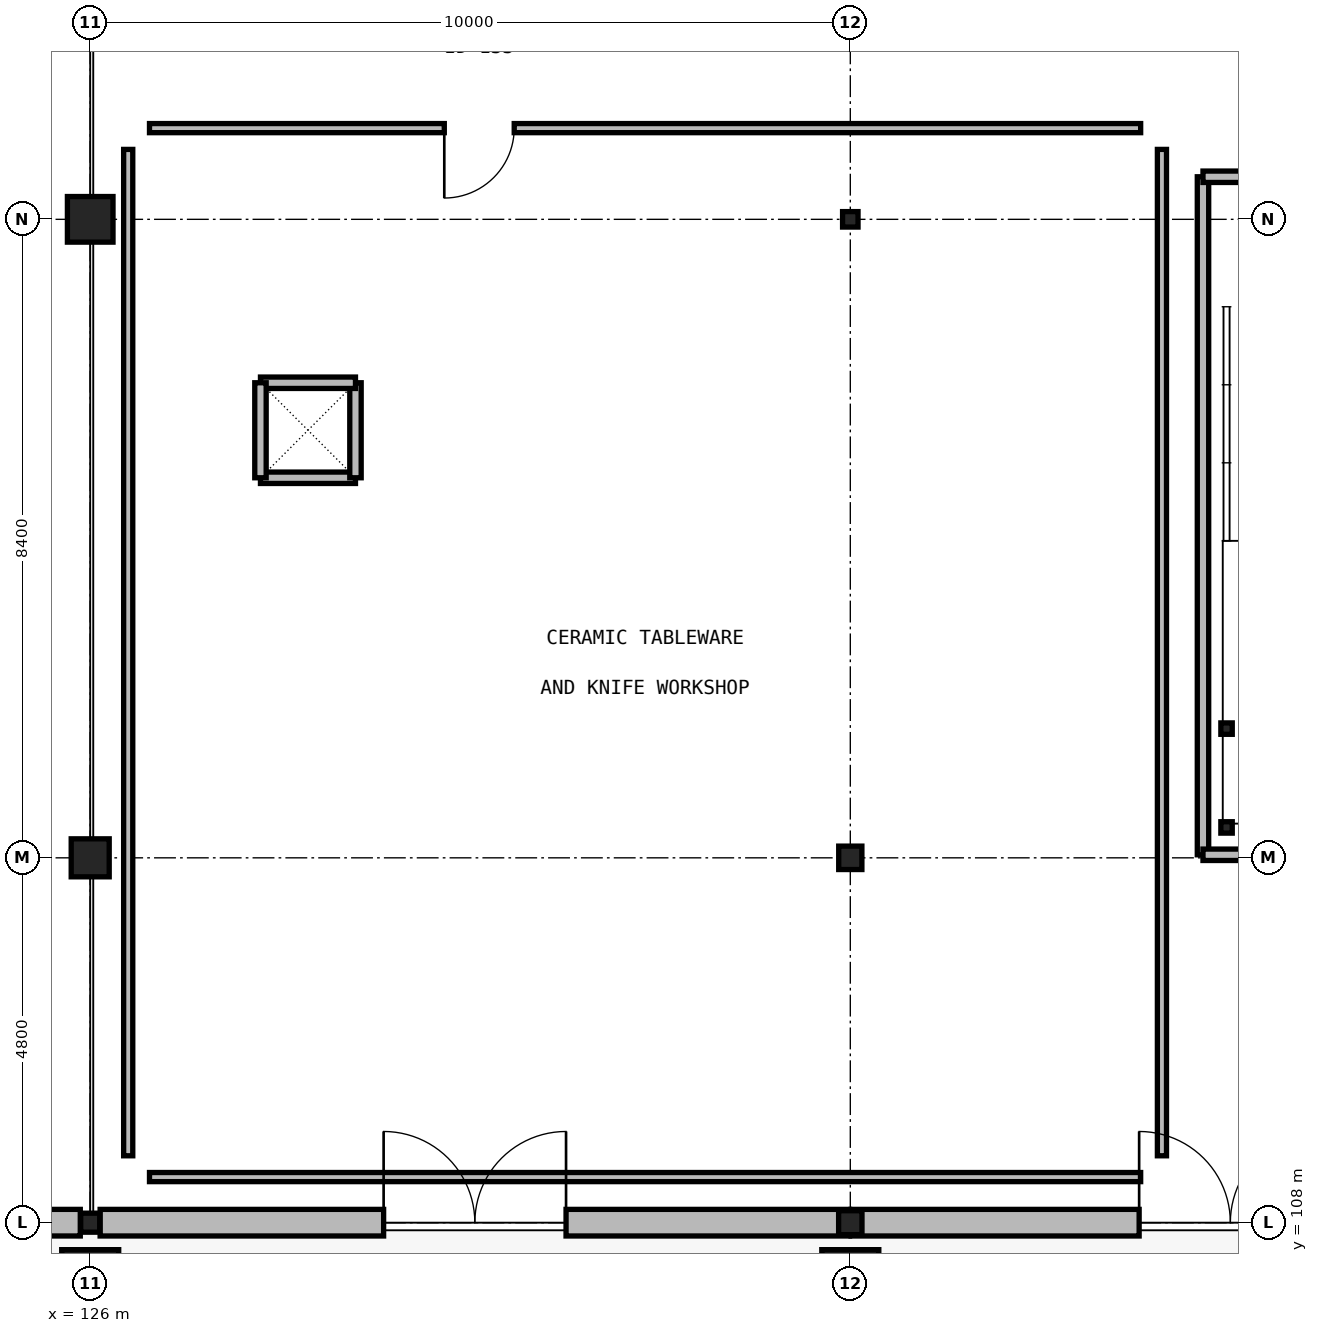
"""IFC4 building model, lengths in metres.
Left out: names, types, materials, properties, quantities, classifications, styles, units other than length and angle.
Written with IfcOpenShell. Run it as: python <this file> out.ifc"""

import sys

from ifc_helpers import new_model, si_unit, direction, frame, frame_2d, origin, origin_2d_with_axis, place, context, subcontext, project, spatial, rectangle, hollow_rectangle, i_section, extrude, element, fill, save


model = new_model("IFC4")
c1 = context("Model", 3, precision=1e-05, world=origin(), true_north=direction((0.0, 1.0)))
c2 = subcontext(c1, "Body", "Model", "MODEL_VIEW")
j1 = project(units=[si_unit("LENGTHUNIT", "METRE"), si_unit("PLANEANGLEUNIT", "RADIAN")], contexts=[c1])
p1 = place(None, origin())
s1 = spatial("IfcSite", under=j1, at=p1, CompositionType="ELEMENT")
p2 = place(p1, origin())
s2 = spatial("IfcBuilding", under=s1, at=p2, CompositionType="ELEMENT")
p3 = place(p2, origin())
s3 = spatial("IfcBuildingStorey", under=s2, at=p3, CompositionType="ELEMENT", Elevation=0.0)
for number, where, z_axis, x_axis in (
    (1, (126.0, 107.42, 0.0), (0.0, 0.0, 1.0), (1.0, 0.0, 0.0)),
    (2, (136.0, 107.42, 0.0), (0.0, 0.0, 1.0), (1.0, 0.0, 0.0)),
):
    element("IfcColumn", number, at=place(p3, frame(where, z_axis=z_axis, x_axis=x_axis)), inside=s3, PredefinedType="PILASTER", context=c2, shape_type="SweptSolid", body=[
        extrude(rectangle(XDim=0.75, YDim=0.45, at=origin_2d_with_axis()), origin(), (0.0, 0.0, 1.0), 4.5),
    ])
p4 = place(p3, frame((126.0, 108.0, -0.28), z_axis=(0.0, 0.0, 1.0), x_axis=(1.0, 0.0, 0.0)))
e3 = element("IfcColumn", 3, at=p4, inside=s3, PredefinedType="COLUMN", context=c2, shape_type="SweptSolid", body=[
    extrude(hollow_rectangle(XDim=0.25, YDim=0.25, WallThickness=0.009, InnerFilletRadius=0.009, OuterFilletRadius=0.018, at=origin_2d_with_axis()), origin(), (0.0, 0.0, 1.0), 4.78),
])
p5 = place(p3, frame((126.0, 112.8, -0.28), z_axis=(0.0, 0.0, 1.0), x_axis=(1.0, 0.0, 0.0)))
e4 = element("IfcColumn", 4, at=p5, inside=s3, PredefinedType="COLUMN", context=c2, shape_type="SweptSolid", body=[
    extrude(rectangle(XDim=0.5, YDim=0.5, at=origin_2d_with_axis()), origin(), (0.0, 0.0, 1.0), 4.78),
])
p6 = place(p3, frame((126.0, 121.2, 0.0), z_axis=(0.0, 0.0, 1.0), x_axis=(1.0, 0.0, 0.0)))
e5 = element("IfcColumn", 5, at=p6, inside=s3, PredefinedType="COLUMN", context=c2, shape_type="SweptSolid", body=[
    extrude(rectangle(XDim=0.6, YDim=0.6, at=origin_2d_with_axis()), origin(), (0.0, 0.0, 1.0), 4.5),
])
p7 = place(p3, frame((136.0, 108.0, -0.28), z_axis=(0.0, 0.0, 1.0), x_axis=(1.0, 0.0, 0.0)))
e6 = element("IfcColumn", 6, at=p7, inside=s3, PredefinedType="COLUMN", context=c2, shape_type="SweptSolid", body=[
    extrude(i_section(OverallWidth=0.307, OverallDepth=0.315, WebThickness=0.012, FlangeThickness=0.019, FilletRadius=0.017, at=origin_2d_with_axis()), origin(), (0.0, 0.0, 1.0), 4.78),
])
p8 = place(p3, frame((136.0, 112.8, -0.28), z_axis=(0.0, 0.0, 1.0), x_axis=(1.0, 0.0, 0.0)))
e7 = element("IfcColumn", 7, at=p8, inside=s3, PredefinedType="COLUMN", context=c2, shape_type="SweptSolid", body=[
    extrude(i_section(OverallWidth=0.305, OverallDepth=0.308, WebThickness=0.01, FlangeThickness=0.015, FilletRadius=0.017, at=origin_2d_with_axis()), origin(), (0.0, 0.0, 1.0), 4.78),
])
p9 = place(p3, frame((136.0, 121.2, 0.0), z_axis=(0.0, 0.0, 1.0), x_axis=(1.0, 0.0, 0.0)))
e8 = element("IfcColumn", 8, at=p9, inside=s3, PredefinedType="COLUMN", context=c2, shape_type="SweptSolid", body=[
    extrude(i_section(OverallWidth=0.203, OverallDepth=0.203, WebThickness=0.007, FlangeThickness=0.011, FilletRadius=0.011, at=origin_2d_with_axis()), origin(), (0.0, 0.0, 1.0), 4.5),
])
for number, where, z_axis, x_axis in (
    (9, (140.95, 113.2, 0.0), (0.0, 0.0, 1.0), (1.0, 0.0, 0.0)),
    (10, (140.95, 114.5, 0.0), (0.0, 0.0, 1.0), (1.0, 0.0, 0.0)),
):
    element("IfcColumn", number, at=place(p3, frame(where, z_axis=z_axis, x_axis=x_axis)), inside=s3, PredefinedType="COLUMN", context=c2, shape_type="SweptSolid", body=[
        extrude(hollow_rectangle(XDim=0.15, YDim=0.15, WallThickness=0.006, InnerFilletRadius=0.006, OuterFilletRadius=0.012, at=origin_2d_with_axis()), origin(), (0.0, 0.0, 1.0), 4.5),
    ])
p10 = place(p3, frame((116.01, 108.0, 0.0), z_axis=(0.0, 0.0, 1.0), x_axis=(1.0, 0.0, 0.0)))
e11 = element("IfcWall", 11, at=p10, inside=s3, PredefinedType="SOLIDWALL", context=c2, shape_type="SweptSolid", body=[
    extrude(rectangle(XDim=9.859, YDim=0.35, at=frame_2d((4.93, 0.0), x_axis=(1.0, 0.0))), origin(), (0.0, 0.0, 1.0), 3.88),
])
p11 = place(p10, frame((3.73, 0.0, 0.0)))
e12 = element("IfcOpeningElement", 12, at=p11, cuts=e11, PredefinedType="OPENING", context=c2, shape_type="SweptSolid", body=[
    extrude(rectangle(XDim=2.4, YDim=2.8, at=frame_2d((1.2, 1.4), x_axis=(1.0, 0.0))), frame((0.0, 0.185, 0.0), z_axis=(0.0, -1.0, 0.0), x_axis=(1.0, 0.0, 0.0)), (0.0, 0.0, 1.0), 0.37),
])
p12 = place(p3, frame((126.131, 108.0, 0.0), z_axis=(0.0, 0.0, 1.0), x_axis=(1.0, 0.0, 0.0)))
e13 = element("IfcWall", 13, at=p12, inside=s3, PredefinedType="SOLIDWALL", context=c2, shape_type="SweptSolid", body=[
    extrude(rectangle(XDim=9.859, YDim=0.35, at=frame_2d((4.93, 0.0), x_axis=(1.0, 0.0))), origin(), (0.0, 0.0, 1.0), 3.88),
])
p13 = place(p12, frame((3.73, 0.0, 0.0)))
e14 = element("IfcOpeningElement", 14, at=p13, cuts=e13, PredefinedType="OPENING", context=c2, shape_type="SweptSolid", body=[
    extrude(rectangle(XDim=2.4, YDim=2.8, at=frame_2d((1.2, 1.4), x_axis=(1.0, 0.0))), frame((0.0, 0.185, 0.0), z_axis=(0.0, -1.0, 0.0), x_axis=(1.0, 0.0, 0.0)), (0.0, 0.0, 1.0), 0.37),
])
p14 = place(p3, frame((136.01, 108.0, 0.0), z_axis=(0.0, 0.0, 1.0), x_axis=(1.0, 0.0, 0.0)))
e15 = element("IfcWall", 15, at=p14, inside=s3, PredefinedType="SOLIDWALL", context=c2, shape_type="SweptSolid", body=[
    extrude(rectangle(XDim=9.98, YDim=0.35, at=frame_2d((4.99, 0.0), x_axis=(1.0, 0.0))), origin(), (0.0, 0.0, 1.0), 3.88),
])
p15 = place(p14, frame((3.79, 0.0, 0.0)))
e16 = element("IfcOpeningElement", 16, at=p15, cuts=e15, PredefinedType="OPENING", context=c2, shape_type="SweptSolid", body=[
    extrude(rectangle(XDim=2.4, YDim=2.8, at=frame_2d((1.2, 1.4), x_axis=(1.0, 0.0))), frame((0.0, 0.185, 0.0), z_axis=(0.0, -1.0, 0.0), x_axis=(1.0, 0.0, 0.0)), (0.0, 0.0, 1.0), 0.37),
])
p16 = place(p3, frame((140.64, 121.76, 0.0), z_axis=(0.0, 0.0, 1.0), x_axis=(0.0, -1.0, 0.0)))
e17 = element("IfcWall", 17, at=p16, inside=s3, PredefinedType="PARTITIONING", context=c2, shape_type="SweptSolid", body=[
    extrude(rectangle(XDim=8.92, YDim=0.15, at=frame_2d((4.46, 0.0), x_axis=(1.0, 0.0))), origin(), (0.0, 0.0, 1.0), 3.66),
])
p17 = place(p3, frame((140.64, 112.84, 0.0), z_axis=(0.0, 0.0, 1.0), x_axis=(1.0, 0.0, 0.0)))
e18 = element("IfcWall", 18, at=p17, inside=s3, PredefinedType="PARTITIONING", context=c2, shape_type="SweptSolid", body=[
    extrude(rectangle(XDim=3.62, YDim=0.15, at=frame_2d((1.81, 0.0), x_axis=(1.0, 0.0))), origin(), (0.0, 0.0, 1.0), 3.66),
])
p18 = place(p3, frame((144.26, 121.76, 0.0), z_axis=(0.0, 0.0, 1.0), x_axis=(-1.0, 0.0, 0.0)))
e19 = element("IfcWall", 19, at=p18, inside=s3, PredefinedType="PARTITIONING", context=c2, shape_type="SweptSolid", body=[
    extrude(rectangle(XDim=3.62, YDim=0.15, at=frame_2d((1.81, 0.0), x_axis=(1.0, 0.0))), origin(), (0.0, 0.0, 1.0), 3.66),
])
p19 = place(p18, frame((1.31, 0.0, 0.0)))
e20 = element("IfcOpeningElement", 20, at=p19, cuts=e19, PredefinedType="OPENING", context=c2, shape_type="SweptSolid", body=[
    extrude(rectangle(XDim=1.0, YDim=2.15, at=frame_2d((0.5, 1.075), x_axis=(1.0, 0.0))), frame((0.0, 0.085, 0.0), z_axis=(0.0, -1.0, 0.0), x_axis=(1.0, 0.0, 0.0)), (0.0, 0.0, 1.0), 0.17),
])
for number, where, z_axis, x_axis in (
    (21, (128.24, 117.8, 0.0), (0.0, 0.0, 1.0), (1.0, 0.0, 0.0)),
    (22, (129.49, 117.8, 0.0), (0.0, 0.0, 1.0), (0.0, 1.0, 0.0)),
    (23, (129.49, 119.05, 0.0), (0.0, 0.0, 1.0), (-1.0, 0.0, 0.0)),
    (24, (128.24, 119.05, 0.0), (0.0, 0.0, 1.0), (0.0, -1.0, 0.0)),
):
    element("IfcWall", number, at=place(p3, frame(where, z_axis=z_axis, x_axis=x_axis)), inside=s3, PredefinedType="PARTITIONING", context=c2, shape_type="SweptSolid", body=[
        extrude(rectangle(XDim=1.25, YDim=0.15, at=frame_2d((0.625, 0.0), x_axis=(1.0, 0.0))), origin(), (0.0, 0.0, 1.0), 3.76),
    ])
p20 = place(p3, frame((126.78, 108.6, 0.0), z_axis=(0.0, 0.0, 1.0), x_axis=(1.0, 0.0, 0.0)))
e25 = element("IfcWall", 25, at=p20, inside=s3, PredefinedType="PARTITIONING", context=c2, shape_type="SweptSolid", body=[
    extrude(rectangle(XDim=13.04, YDim=0.12, at=frame_2d((6.52, 0.0), x_axis=(1.0, 0.0))), origin(), (0.0, 0.0, 1.0), 3.62),
])
p21 = place(p3, frame((140.1, 108.88, 0.0), z_axis=(0.0, 0.0, 1.0), x_axis=(0.0, 1.0, 0.0)))
e26 = element("IfcWall", 26, at=p21, inside=s3, PredefinedType="PARTITIONING", context=c2, shape_type="SweptSolid", body=[
    extrude(rectangle(XDim=13.24, YDim=0.12, at=frame_2d((6.62, 0.0), x_axis=(1.0, 0.0))), origin(), (0.0, 0.0, 1.0), 3.62),
])
p22 = place(p3, frame((139.82, 122.4, 0.0), z_axis=(0.0, 0.0, 1.0), x_axis=(-1.0, 0.0, 0.0)))
e27 = element("IfcWall", 27, at=p22, inside=s3, PredefinedType="PARTITIONING", context=c2, shape_type="SweptSolid", body=[
    extrude(rectangle(XDim=13.04, YDim=0.12, at=frame_2d((6.52, 0.0), x_axis=(1.0, 0.0))), origin(), (0.0, 0.0, 1.0), 3.62),
])
p23 = place(p22, frame((8.242, 0.0, 0.0)))
e28 = element("IfcOpeningElement", 28, at=p23, cuts=e27, PredefinedType="OPENING", context=c2, shape_type="SweptSolid", body=[
    extrude(rectangle(XDim=0.92, YDim=2.15, at=frame_2d((0.46, 1.075), x_axis=(1.0, 0.0))), frame((0.0, 0.07, 0.0), z_axis=(0.0, -1.0, 0.0), x_axis=(1.0, 0.0, 0.0)), (0.0, 0.0, 1.0), 0.14),
])
p24 = place(p3, frame((126.5, 122.12, 0.0), z_axis=(0.0, 0.0, 1.0), x_axis=(0.0, -1.0, 0.0)))
e29 = element("IfcWall", 29, at=p24, inside=s3, PredefinedType="PARTITIONING", context=c2, shape_type="SweptSolid", body=[
    extrude(rectangle(XDim=13.24, YDim=0.12, at=frame_2d((6.62, 0.0), x_axis=(1.0, 0.0))), origin(), (0.0, 0.0, 1.0), 3.62),
])
p25 = place(p13, origin())
e30 = element("IfcDoor", 30, at=p25, inside=s3, OperationType="DOUBLE_SWING_LEFT", PredefinedType="DOOR", context=c2, shape_type="SweptSolid", body=[
    extrude(rectangle(XDim=2.4, YDim=2.8, at=frame_2d((1.2, 1.4), x_axis=(1.0, 0.0))), frame((0.0, 0.025, 0.0), z_axis=(0.0, -1.0, 0.0), x_axis=(1.0, 0.0, 0.0)), (0.0, 0.0, 1.0), 0.05),
])
fill(e14, e30)
p26 = place(p15, origin())
e31 = element("IfcDoor", 31, at=p26, inside=s3, OperationType="DOUBLE_SWING_LEFT", PredefinedType="DOOR", context=c2, shape_type="SweptSolid", body=[
    extrude(rectangle(XDim=2.4, YDim=2.8, at=frame_2d((1.2, 1.4), x_axis=(1.0, 0.0))), frame((0.0, 0.025, 0.0), z_axis=(0.0, -1.0, 0.0), x_axis=(1.0, 0.0, 0.0)), (0.0, 0.0, 1.0), 0.05),
])
fill(e16, e31)
p27 = place(p23, origin())
e32 = element("IfcDoor", 32, at=p27, inside=s3, OperationType="SINGLE_SWING_RIGHT", PredefinedType="DOOR", context=c2, shape_type="SweptSolid", body=[
    extrude(rectangle(XDim=0.92, YDim=2.15, at=frame_2d((0.46, 1.075), x_axis=(1.0, 0.0))), frame((0.0, 0.025, 0.0), z_axis=(0.0, -1.0, 0.0), x_axis=(1.0, 0.0, 0.0)), (0.0, 0.0, 1.0), 0.05),
])
fill(e28, e32)
save(model, sys.argv[1])
